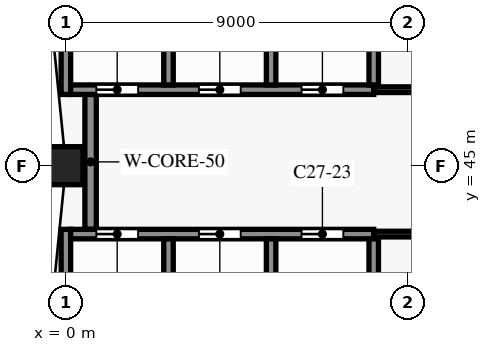
"""IFC4 building model, lengths in metres.
Left out: names, types, materials, properties, quantities, classifications, styles, units other than length and angle.
Written with IfcOpenShell. Run it as: python <this file> out.ifc"""

import sys

from ifc_helpers import new_model, si_unit, direction, frame, frame_2d, origin, origin_2d, place, context, subcontext, project, spatial, rectangle, extrude, element, fill, save


model = new_model("IFC4")
c1 = context("Model", 3, precision=1e-05, world=origin(), true_north=direction((0.0, 1.0)))
c2 = subcontext(c1, "Body", "Model", "MODEL_VIEW")
j1 = project(units=[si_unit("LENGTHUNIT", "METRE"), si_unit("PLANEANGLEUNIT", "RADIAN")], contexts=[c1])
p1 = place(None, origin())
s1 = spatial("IfcSite", under=j1, at=p1, CompositionType="ELEMENT")
p2 = place(p1, origin())
s2 = spatial("IfcBuilding", under=s1, at=p2, CompositionType="ELEMENT")
p3 = place(p2, frame((0.0, 0.0, 198.8)))
s3 = spatial("IfcBuildingStorey", under=s2, at=p3, CompositionType="ELEMENT", Elevation=198.8)
p4 = place(p3, frame((0.0, 45.0, 0.0), z_axis=(0.0, 0.0, 1.0), x_axis=(0.0, -1.0, 0.0)))
e1 = element("IfcColumn", 1, at=p4, inside=s3, PredefinedType="COLUMN", context=c2, shape_type="SweptSolid", body=[
    extrude(rectangle(XDim=0.9, YDim=1.0, at=origin_2d()), origin(), (0.0, 0.0, 1.0), 3.8),
])
p5 = place(p3, frame((8.1, 43.2, 0.0), z_axis=(0.0, 0.0, 1.0), x_axis=(1.0, 0.0, 0.0)))
e2 = element("IfcWall", 2, at=p5, inside=s3, PredefinedType="PARTITIONING", context=c2, shape_type="SweptSolid", body=[
    extrude(rectangle(XDim=16.125, YDim=0.15, at=frame_2d((8.062, 0.0))), origin(), (0.0, 0.0, 1.0), 3.5),
])
p6 = place(p5, frame((4.05, 0.0, 0.0)))
e3 = element("IfcOpeningElement", 3, at=p6, cuts=e2, PredefinedType="OPENING", context=c2, shape_type="SweptSolid", body=[
    extrude(rectangle(XDim=0.9, YDim=2.1, at=frame_2d((0.45, 1.05))), frame((0.0, 0.085, 0.0), z_axis=(0.0, -1.0, 0.0), x_axis=(1.0, 0.0, 0.0)), (0.0, 0.0, 1.0), 0.17),
])
p7 = place(p5, frame((12.15, 0.0, 0.0)))
e4 = element("IfcOpeningElement", 4, at=p7, cuts=e2, PredefinedType="OPENING", context=c2, shape_type="SweptSolid", body=[
    extrude(rectangle(XDim=0.9, YDim=2.1, at=frame_2d((0.45, 1.05))), frame((0.0, 0.085, 0.0), z_axis=(0.0, -1.0, 0.0), x_axis=(1.0, 0.0, 0.0)), (0.0, 0.0, 1.0), 0.17),
])
p8 = place(p3, frame((0.125, 43.2, 0.0), z_axis=(0.0, 0.0, 1.0), x_axis=(1.0, 0.0, 0.0)))
e5 = element("IfcWall", 5, at=p8, inside=s3, PredefinedType="SHEAR", context=c2, shape_type="SweptSolid", body=[
    extrude(rectangle(XDim=7.975, YDim=0.25, at=frame_2d((3.988, 0.0))), origin(), (0.0, 0.0, 1.0), 3.5),
])
p9 = place(p8, frame((0.675, 0.0, 0.0)))
e6 = element("IfcOpeningElement", 6, at=p9, cuts=e5, PredefinedType="OPENING", context=c2, shape_type="SweptSolid", body=[
    extrude(rectangle(XDim=1.1, YDim=2.1, at=frame_2d((0.55, 1.05))), frame((0.0, 0.135, 0.0), z_axis=(0.0, -1.0, 0.0), x_axis=(1.0, 0.0, 0.0)), (0.0, 0.0, 1.0), 0.27),
])
p10 = place(p8, frame((3.375, 0.0, 0.0)))
e7 = element("IfcOpeningElement", 7, at=p10, cuts=e5, PredefinedType="OPENING", context=c2, shape_type="SweptSolid", body=[
    extrude(rectangle(XDim=1.1, YDim=2.1, at=frame_2d((0.55, 1.05))), frame((0.0, 0.135, 0.0), z_axis=(0.0, -1.0, 0.0), x_axis=(1.0, 0.0, 0.0)), (0.0, 0.0, 1.0), 0.27),
])
p11 = place(p8, frame((6.075, 0.0, 0.0)))
e8 = element("IfcOpeningElement", 8, at=p11, cuts=e5, PredefinedType="OPENING", context=c2, shape_type="SweptSolid", body=[
    extrude(rectangle(XDim=1.1, YDim=2.1, at=frame_2d((0.55, 1.05))), frame((0.0, 0.135, 0.0), z_axis=(0.0, -1.0, 0.0), x_axis=(1.0, 0.0, 0.0)), (0.0, 0.0, 1.0), 0.27),
])
p12 = place(p3, frame((8.1, 47.0, 0.0), z_axis=(0.0, 0.0, 1.0), x_axis=(1.0, 0.0, 0.0)))
e9 = element("IfcWall", 9, at=p12, inside=s3, PredefinedType="PARTITIONING", context=c2, shape_type="SweptSolid", body=[
    extrude(rectangle(XDim=13.5, YDim=0.15, at=frame_2d((6.75, 0.0))), origin(), (0.0, 0.0, 1.0), 3.5),
])
p13 = place(p12, frame((3.3, 0.0, 0.0)))
e10 = element("IfcOpeningElement", 10, at=p13, cuts=e9, PredefinedType="OPENING", context=c2, shape_type="SweptSolid", body=[
    extrude(rectangle(XDim=0.9, YDim=2.1, at=frame_2d((0.45, 1.05))), frame((0.0, 0.085, 0.0), z_axis=(0.0, -1.0, 0.0), x_axis=(1.0, 0.0, 0.0)), (0.0, 0.0, 1.0), 0.17),
])
p14 = place(p12, frame((10.05, 0.0, 0.0)))
e11 = element("IfcOpeningElement", 11, at=p14, cuts=e9, PredefinedType="OPENING", context=c2, shape_type="SweptSolid", body=[
    extrude(rectangle(XDim=0.9, YDim=2.1, at=frame_2d((0.45, 1.05))), frame((0.0, 0.085, 0.0), z_axis=(0.0, -1.0, 0.0), x_axis=(1.0, 0.0, 0.0)), (0.0, 0.0, 1.0), 0.17),
])
p15 = place(p3, frame((0.125, 47.0, 0.0), z_axis=(0.0, 0.0, 1.0), x_axis=(1.0, 0.0, 0.0)))
e12 = element("IfcWall", 12, at=p15, inside=s3, PredefinedType="SHEAR", context=c2, shape_type="SweptSolid", body=[
    extrude(rectangle(XDim=7.975, YDim=0.25, at=frame_2d((3.988, 0.0))), origin(), (0.0, 0.0, 1.0), 3.5),
])
p16 = place(p15, frame((0.675, 0.0, 0.0)))
e13 = element("IfcOpeningElement", 13, at=p16, cuts=e12, PredefinedType="OPENING", context=c2, shape_type="SweptSolid", body=[
    extrude(rectangle(XDim=1.1, YDim=2.1, at=frame_2d((0.55, 1.05))), frame((0.0, 0.135, 0.0), z_axis=(0.0, -1.0, 0.0), x_axis=(1.0, 0.0, 0.0)), (0.0, 0.0, 1.0), 0.27),
])
p17 = place(p15, frame((3.375, 0.0, 0.0)))
e14 = element("IfcOpeningElement", 14, at=p17, cuts=e12, PredefinedType="OPENING", context=c2, shape_type="SweptSolid", body=[
    extrude(rectangle(XDim=1.1, YDim=2.1, at=frame_2d((0.55, 1.05))), frame((0.0, 0.135, 0.0), z_axis=(0.0, -1.0, 0.0), x_axis=(1.0, 0.0, 0.0)), (0.0, 0.0, 1.0), 0.27),
])
p18 = place(p15, frame((6.075, 0.0, 0.0)))
e15 = element("IfcOpeningElement", 15, at=p18, cuts=e12, PredefinedType="OPENING", context=c2, shape_type="SweptSolid", body=[
    extrude(rectangle(XDim=1.1, YDim=2.1, at=frame_2d((0.55, 1.05))), frame((0.0, 0.135, 0.0), z_axis=(0.0, -1.0, 0.0), x_axis=(1.0, 0.0, 0.0)), (0.0, 0.0, 1.0), 0.27),
])
p19 = place(p3, frame((0.0, 40.0, 0.0), z_axis=(0.0, 0.0, 1.0), x_axis=(0.0, 1.0, 0.0)))
e16 = element("IfcWall", 16, at=p19, inside=s3, PredefinedType="SHEAR", context=c2, shape_type="SweptSolid", body=[
    extrude(rectangle(XDim=3.325, YDim=0.25, at=frame_2d((1.663, 0.0))), origin(), (0.0, 0.0, 1.0), 3.5),
])
p20 = place(p3, frame((0.0, 46.875, 0.0), z_axis=(0.0, 0.0, 1.0), x_axis=(0.0, 1.0, 0.0)))
e17 = element("IfcWall", 17, at=p20, inside=s3, PredefinedType="SHEAR", context=c2, shape_type="SweptSolid", body=[
    extrude(rectangle(XDim=3.475, YDim=0.25, at=frame_2d((1.738, 0.0))), origin(), (0.0, 0.0, 1.0), 3.5),
])
p21 = place(p3, frame((0.65, 43.325, 0.0), z_axis=(0.0, 0.0, 1.0), x_axis=(0.0, 1.0, 0.0)))
e18 = element("IfcWall", 18, at=p21, inside=s3, PredefinedType="SHEAR", context=c2, shape_type="SweptSolid", body=[
    extrude(rectangle(XDim=3.55, YDim=0.3, at=frame_2d((1.775, 0.0))), origin(), (0.0, 0.0, 1.0), 3.5),
])
for number, where, z_axis, x_axis in (
    (19, (2.7, 40.125, 0.0), (0.0, 0.0, 1.0), (0.0, 1.0, 0.0)),
    (20, (2.7, 47.125, 0.0), (0.0, 0.0, 1.0), (0.0, 1.0, 0.0)),
    (21, (5.4, 40.125, 0.0), (0.0, 0.0, 1.0), (0.0, 1.0, 0.0)),
    (22, (5.4, 47.125, 0.0), (0.0, 0.0, 1.0), (0.0, 1.0, 0.0)),
    (23, (8.1, 40.125, 0.0), (0.0, 0.0, 1.0), (0.0, 1.0, 0.0)),
):
    element("IfcWall", number, at=place(p3, frame(where, z_axis=z_axis, x_axis=x_axis)), inside=s3, PredefinedType="SHEAR", context=c2, shape_type="SweptSolid", body=[
        extrude(rectangle(XDim=2.95, YDim=0.25, at=frame_2d((1.475, 0.0))), origin(), (0.0, 0.0, 1.0), 3.5),
    ])
p22 = place(p3, frame((8.1, 47.125, 0.0), z_axis=(0.0, 0.0, 1.0), x_axis=(0.0, 1.0, 0.0)))
e24 = element("IfcWall", 24, at=p22, inside=s3, PredefinedType="SHEAR", context=c2, shape_type="SweptSolid", body=[
    extrude(rectangle(XDim=3.075, YDim=0.25, at=frame_2d((1.538, 0.0))), origin(), (0.0, 0.0, 1.0), 3.5),
])
p23 = place(p9, origin())
e25 = element("IfcDoor", 25, at=p23, inside=s3, OperationType="DOUBLE_DOOR_SLIDING", PredefinedType="DOOR", context=c2, shape_type="SweptSolid", body=[
    extrude(rectangle(XDim=1.1, YDim=2.1, at=frame_2d((0.55, 1.05))), frame((0.0, 0.025, 0.0), z_axis=(0.0, -1.0, 0.0), x_axis=(1.0, 0.0, 0.0)), (0.0, 0.0, 1.0), 0.05),
])
fill(e6, e25)
p24 = place(p10, origin())
e26 = element("IfcDoor", 26, at=p24, inside=s3, OperationType="DOUBLE_DOOR_SLIDING", PredefinedType="DOOR", context=c2, shape_type="SweptSolid", body=[
    extrude(rectangle(XDim=1.1, YDim=2.1, at=frame_2d((0.55, 1.05))), frame((0.0, 0.025, 0.0), z_axis=(0.0, -1.0, 0.0), x_axis=(1.0, 0.0, 0.0)), (0.0, 0.0, 1.0), 0.05),
])
fill(e7, e26)
p25 = place(p11, origin())
e27 = element("IfcDoor", 27, at=p25, inside=s3, OperationType="DOUBLE_DOOR_SLIDING", PredefinedType="DOOR", context=c2, shape_type="SweptSolid", body=[
    extrude(rectangle(XDim=1.1, YDim=2.1, at=frame_2d((0.55, 1.05))), frame((0.0, 0.025, 0.0), z_axis=(0.0, -1.0, 0.0), x_axis=(1.0, 0.0, 0.0)), (0.0, 0.0, 1.0), 0.05),
])
fill(e8, e27)
p26 = place(p16, origin())
e28 = element("IfcDoor", 28, at=p26, inside=s3, OperationType="DOUBLE_DOOR_SLIDING", PredefinedType="DOOR", context=c2, shape_type="SweptSolid", body=[
    extrude(rectangle(XDim=1.1, YDim=2.1, at=frame_2d((0.55, 1.05))), frame((0.0, 0.025, 0.0), z_axis=(0.0, -1.0, 0.0), x_axis=(1.0, 0.0, 0.0)), (0.0, 0.0, 1.0), 0.05),
])
fill(e13, e28)
p27 = place(p17, origin())
e29 = element("IfcDoor", 29, at=p27, inside=s3, OperationType="DOUBLE_DOOR_SLIDING", PredefinedType="DOOR", context=c2, shape_type="SweptSolid", body=[
    extrude(rectangle(XDim=1.1, YDim=2.1, at=frame_2d((0.55, 1.05))), frame((0.0, 0.025, 0.0), z_axis=(0.0, -1.0, 0.0), x_axis=(1.0, 0.0, 0.0)), (0.0, 0.0, 1.0), 0.05),
])
fill(e14, e29)
p28 = place(p18, origin())
e30 = element("IfcDoor", 30, at=p28, inside=s3, OperationType="DOUBLE_DOOR_SLIDING", PredefinedType="DOOR", context=c2, shape_type="SweptSolid", body=[
    extrude(rectangle(XDim=1.1, YDim=2.1, at=frame_2d((0.55, 1.05))), frame((0.0, 0.025, 0.0), z_axis=(0.0, -1.0, 0.0), x_axis=(1.0, 0.0, 0.0)), (0.0, 0.0, 1.0), 0.05),
])
fill(e15, e30)
save(model, sys.argv[1])
